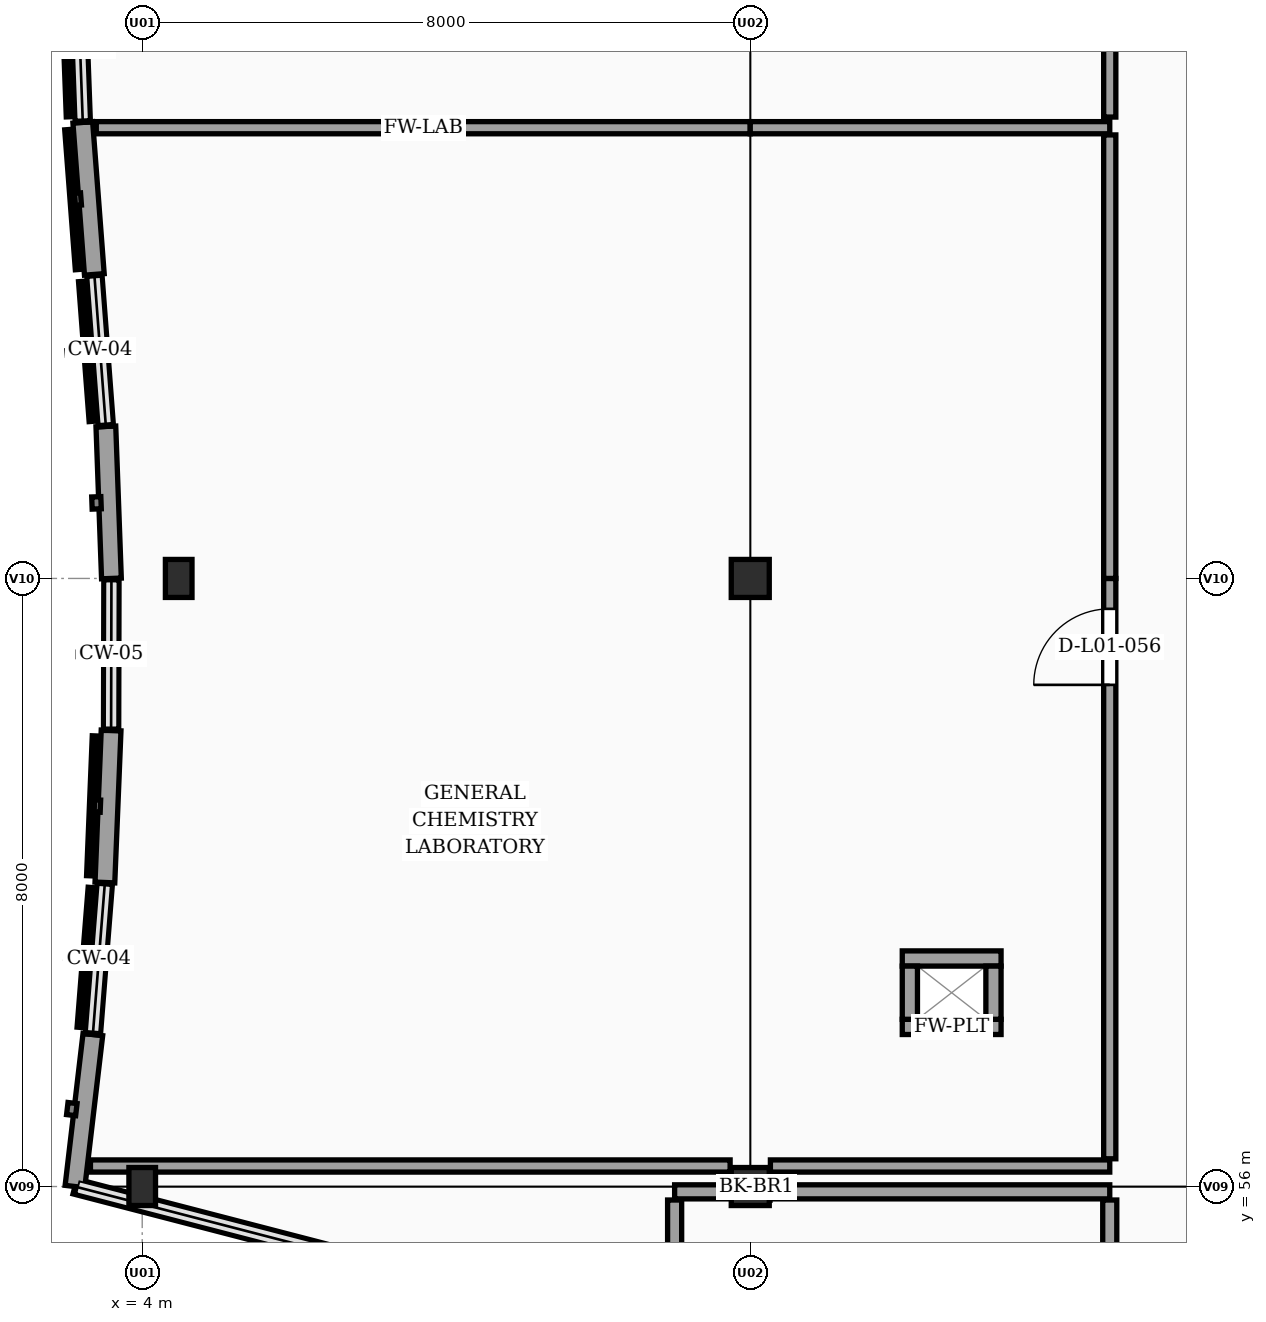
"""IFC4 building model, lengths in metres.
Left out: names, types, materials, properties, quantities, classifications, styles, units other than length and angle.
Written with IfcOpenShell. Run it as: python <this file> out.ifc"""

import sys

from ifc_helpers import new_model, si_unit, direction, frame, frame_2d, origin, origin_2d, place, context, subcontext, project, spatial, rectangle, extrude, element, fill, save


model = new_model("IFC4")
c1 = context("Model", 3, precision=1e-05, world=origin(), true_north=direction((0.0, 1.0)))
c2 = subcontext(c1, "Body", "Model", "MODEL_VIEW")
j1 = project(units=[si_unit("LENGTHUNIT", "METRE"), si_unit("PLANEANGLEUNIT", "RADIAN")], contexts=[c1])
p1 = place(None, origin())
s1 = spatial("IfcSite", under=j1, at=p1, CompositionType="ELEMENT")
p2 = place(p1, origin())
s2 = spatial("IfcBuilding", under=s1, at=p2, CompositionType="ELEMENT")
p3 = place(p2, frame((0.0, 0.0, 4.5)))
s3 = spatial("IfcBuildingStorey", under=s2, at=p3, CompositionType="ELEMENT", Elevation=4.5)
for number, where, z_axis, x_axis in (
    (1, (4.0, 56.0, 0.0), (0.0, 0.0, 1.0), (1.0, 0.0, 0.0)),
    (2, (4.48, 64.0, 0.0), (0.0, 0.0, 1.0), (1.0, 0.0, 0.0)),
):
    element("IfcColumn", number, at=place(p3, frame(where, z_axis=z_axis, x_axis=x_axis)), inside=s3, PredefinedType="PILASTER", context=c2, shape_type="SweptSolid", body=[
        extrude(rectangle(XDim=0.35, YDim=0.5, at=origin_2d()), origin(), (0.0, 0.0, 1.0), 3.9),
    ])
for number, where, z_axis, x_axis in (
    (3, (12.0, 56.0, 0.0), (0.0, 0.0, 1.0), (1.0, 0.0, 0.0)),
    (4, (12.0, 64.0, 0.0), (0.0, 0.0, 1.0), (1.0, 0.0, 0.0)),
):
    element("IfcColumn", number, at=place(p3, frame(where, z_axis=z_axis, x_axis=x_axis)), inside=s3, PredefinedType="COLUMN", context=c2, shape_type="SweptSolid", body=[
        extrude(rectangle(XDim=0.5, YDim=0.5, at=origin_2d()), origin(), (0.0, 0.0, 1.0), 3.9),
    ])
p4 = place(p3, frame((10.822, 54.0, 0.0), z_axis=(0.0, 0.0, 1.0), x_axis=(-0.967937555254, 0.251190941573, 0.0)))
e5 = element("IfcWall", 5, at=p4, inside=s3, PredefinedType="SOLIDWALL", context=c2, shape_type="SweptSolid", body=[
    extrude(rectangle(XDim=7.962, YDim=0.2, at=frame_2d((3.981, 0.0))), origin(), (0.0, 0.0, 1.0), 0.95),
])
p5 = place(p3, frame((3.115, 56.0, 0.0), z_axis=(0.0, 0.0, 1.0), x_axis=(0.116988959085, 0.99313321536, 0.0)))
e6 = element("IfcWall", 6, at=p5, inside=s3, PredefinedType="SOLIDWALL", context=c2, shape_type="SweptSolid", body=[
    extrude(rectangle(XDim=2.014, YDim=0.26, at=frame_2d((1.007, 0.0))), origin(), (0.0, 0.0, 1.0), 3.65),
])
p6 = place(p3, frame((3.351, 58.0, 0.0), z_axis=(0.0, 0.0, 1.0), x_axis=(0.078976178075, 0.996876503533, 0.0)))
e7 = element("IfcWall", 7, at=p6, inside=s3, PredefinedType="SOLIDWALL", context=c2, shape_type="SweptSolid", body=[
    extrude(rectangle(XDim=2.006, YDim=0.2, at=frame_2d((1.003, 0.0))), origin(), (0.0, 0.0, 1.0), 0.95),
])
p7 = place(p3, frame((3.509, 60.0, 0.0), z_axis=(0.0, 0.0, 1.0), x_axis=(0.040737639062, 0.99916987783, 0.0)))
e8 = element("IfcWall", 8, at=p7, inside=s3, PredefinedType="SOLIDWALL", context=c2, shape_type="SweptSolid", body=[
    extrude(rectangle(XDim=2.002, YDim=0.26, at=frame_2d((1.001, 0.0))), origin(), (0.0, 0.0, 1.0), 3.65),
])
p8 = place(p3, frame((3.591, 62.0, 0.0), z_axis=(0.0, 0.0, 1.0), x_axis=(0.002197260321, 0.999997586021, 0.0)))
e9 = element("IfcWall", 9, at=p8, inside=s3, PredefinedType="SOLIDWALL", context=c2, shape_type="SweptSolid", body=[
    extrude(rectangle(XDim=2.0, YDim=0.2, at=frame_2d((1.0, 0.0))), origin(), (0.0, 0.0, 1.0), 0.95),
])
p9 = place(p3, frame((3.595, 64.0, 0.0), z_axis=(0.0, 0.0, 1.0), x_axis=(-0.036596562065, 0.999330121454, 0.0)))
e10 = element("IfcWall", 10, at=p9, inside=s3, PredefinedType="SOLIDWALL", context=c2, shape_type="SweptSolid", body=[
    extrude(rectangle(XDim=2.001, YDim=0.26, at=frame_2d((1.0, 0.0))), origin(), (0.0, 0.0, 1.0), 3.65),
])
p10 = place(p3, frame((3.522, 66.0, 0.0), z_axis=(0.0, 0.0, 1.0), x_axis=(-0.075588789742, 0.997139074987, 0.0)))
e11 = element("IfcWall", 11, at=p10, inside=s3, PredefinedType="SOLIDWALL", context=c2, shape_type="SweptSolid", body=[
    extrude(rectangle(XDim=2.006, YDim=0.2, at=frame_2d((1.003, 0.0))), origin(), (0.0, 0.0, 1.0), 0.95),
])
p11 = place(p3, frame((3.37, 68.0, 0.0), z_axis=(0.0, 0.0, 1.0), x_axis=(-0.075709813676, 0.9971298933, 0.0)))
e12 = element("IfcWall", 12, at=p11, inside=s3, PredefinedType="SOLIDWALL", context=c2, shape_type="SweptSolid", body=[
    extrude(rectangle(XDim=2.006, YDim=0.26, at=frame_2d((1.003, 0.0))), origin(), (0.0, 0.0, 1.0), 3.65),
])
p12 = place(p3, frame((3.218, 70.0, 0.0), z_axis=(0.0, 0.0, 1.0), x_axis=(-0.036596562065, 0.999330121454, 0.0)))
e13 = element("IfcWall", 13, at=p12, inside=s3, PredefinedType="SOLIDWALL", context=c2, shape_type="SweptSolid", body=[
    extrude(rectangle(XDim=2.001, YDim=0.2, at=frame_2d((1.0, 0.0))), origin(), (0.0, 0.0, 1.0), 0.95),
])
for number, where, z_axis, x_axis in (
    (14, (15.3, 58.1, 0.0), (0.0, 0.0, 1.0), (-1.0, 0.0, 0.0)),
    (15, (14.0, 59.0, 0.0), (0.0, 0.0, 1.0), (1.0, 0.0, 0.0)),
):
    element("IfcWall", number, at=place(p3, frame(where, z_axis=z_axis, x_axis=x_axis)), inside=s3, PredefinedType="PARTITIONING", context=c2, shape_type="SweptSolid", body=[
        extrude(rectangle(XDim=1.3, YDim=0.2, at=frame_2d((0.65, 0.0))), origin(), (0.0, 0.0, 1.0), 3.65),
    ])
for number, where, z_axis, x_axis in (
    (16, (14.1, 58.2, 0.0), (0.0, 0.0, 1.0), (0.0, 1.0, 0.0)),
    (17, (15.2, 58.9, 0.0), (0.0, 0.0, 1.0), (0.0, -1.0, 0.0)),
):
    element("IfcWall", number, at=place(p3, frame(where, z_axis=z_axis, x_axis=x_axis)), inside=s3, PredefinedType="PARTITIONING", context=c2, shape_type="SweptSolid", body=[
        extrude(rectangle(XDim=0.7, YDim=0.2, at=frame_2d((0.35, 0.0))), origin(), (0.0, 0.0, 1.0), 3.65),
    ])
p13 = place(p3, frame((3.319, 56.27, 0.0), z_axis=(0.0, 0.0, 1.0), x_axis=(1.0, 0.0, 0.0)))
e18 = element("IfcWall", 18, at=p13, inside=s3, PredefinedType="PARTITIONING", context=c2, shape_type="SweptSolid", body=[
    extrude(rectangle(XDim=8.416, YDim=0.16, at=frame_2d((4.208, 0.0))), origin(), (0.0, 0.0, 1.0), 3.0),
])
p14 = place(p3, frame((12.265, 56.27, 0.0), z_axis=(0.0, 0.0, 1.0), x_axis=(1.0, 0.0, 0.0)))
e19 = element("IfcWall", 19, at=p14, inside=s3, PredefinedType="PARTITIONING", context=c2, shape_type="SweptSolid", body=[
    extrude(rectangle(XDim=4.465, YDim=0.16, at=frame_2d((2.232, 0.0))), origin(), (0.0, 0.0, 1.0), 3.0),
])
p15 = place(p3, frame((3.396, 69.93, 0.0), z_axis=(0.0, 0.0, 1.0), x_axis=(1.0, 0.0, 0.0)))
e20 = element("IfcWall", 20, at=p15, inside=s3, PredefinedType="PARTITIONING", context=c2, shape_type="SweptSolid", body=[
    extrude(rectangle(XDim=8.604, YDim=0.16, at=frame_2d((4.302, 0.0))), origin(), (0.0, 0.0, 1.0), 3.65),
])
p16 = place(p3, frame((12.0, 69.93, 0.0), z_axis=(0.0, 0.0, 1.0), x_axis=(1.0, 0.0, 0.0)))
e21 = element("IfcWall", 21, at=p16, inside=s3, PredefinedType="PARTITIONING", context=c2, shape_type="SweptSolid", body=[
    extrude(rectangle(XDim=4.73, YDim=0.16, at=frame_2d((2.365, 0.0))), origin(), (0.0, 0.0, 1.0), 3.65),
])
p17 = place(p3, frame((16.73, 56.365, 0.0), z_axis=(0.0, 0.0, 1.0), x_axis=(0.0, 1.0, 0.0)))
e22 = element("IfcWall", 22, at=p17, inside=s3, PredefinedType="PARTITIONING", context=c2, shape_type="SweptSolid", body=[
    extrude(rectangle(XDim=7.635, YDim=0.16, at=frame_2d((3.817, 0.0))), origin(), (0.0, 0.0, 1.0), 3.65),
])
p18 = place(p17, frame((6.235, 0.0, 0.0)))
e23 = element("IfcOpeningElement", 23, at=p18, cuts=e22, PredefinedType="OPENING", context=c2, shape_type="SweptSolid", body=[
    extrude(rectangle(XDim=1.0, YDim=2.15, at=frame_2d((0.5, 1.075))), frame((0.0, 0.09, 0.0), z_axis=(0.0, -1.0, 0.0), x_axis=(1.0, 0.0, 0.0)), (0.0, 0.0, 1.0), 0.18),
])
p19 = place(p3, frame((16.73, 64.0, 0.0), z_axis=(0.0, 0.0, 1.0), x_axis=(0.0, 1.0, 0.0)))
e24 = element("IfcWall", 24, at=p19, inside=s3, PredefinedType="PARTITIONING", context=c2, shape_type="SweptSolid", body=[
    extrude(rectangle(XDim=5.835, YDim=0.16, at=frame_2d((2.917, 0.0))), origin(), (0.0, 0.0, 1.0), 3.65),
])
p20 = place(p3, frame((16.73, 70.07, 0.0), z_axis=(0.0, 0.0, 1.0), x_axis=(0.0, 1.0, 0.0)))
e25 = element("IfcWall", 25, at=p20, inside=s3, PredefinedType="PARTITIONING", context=c2, shape_type="SweptSolid", body=[
    extrude(rectangle(XDim=1.93, YDim=0.16, at=frame_2d((0.965, 0.0))), origin(), (0.0, 0.0, 1.0), 3.65),
])
p21 = place(p3, frame((11.005, 55.93, 0.0), z_axis=(0.0, 0.0, 1.0), x_axis=(1.0, 0.0, 0.0)))
e26 = element("IfcWall", 26, at=p21, inside=s3, PredefinedType="PARTITIONING", context=c2, shape_type="SweptSolid", body=[
    extrude(rectangle(XDim=5.725, YDim=0.185, at=frame_2d((2.863, 0.0))), origin(), (0.0, 0.0, 1.0), 3.0),
])
p22 = place(p3, frame((11.005, 54.02, 0.0), z_axis=(0.0, 0.0, 1.0), x_axis=(0.0, 1.0, 0.0)))
e27 = element("IfcWall", 27, at=p22, inside=s3, PredefinedType="PARTITIONING", context=c2, shape_type="SweptSolid", body=[
    extrude(rectangle(XDim=1.802, YDim=0.185, at=frame_2d((0.901, 0.0))), origin(), (0.0, 0.0, 1.0), 3.65),
])
p23 = place(p3, frame((16.73, 50.0, 0.0), z_axis=(0.0, 0.0, 1.0), x_axis=(0.0, 1.0, 0.0)))
e28 = element("IfcWall", 28, at=p23, inside=s3, PredefinedType="PARTITIONING", context=c2, shape_type="SweptSolid", body=[
    extrude(rectangle(XDim=5.823, YDim=0.185, at=frame_2d((2.911, 0.0))), origin(), (0.0, 0.0, 1.0), 3.65),
])
p24 = place(p23, frame((2.54, 0.0, 0.0)))
e29 = element("IfcOpeningElement", 29, at=p24, cuts=e28, PredefinedType="OPENING", context=c2, shape_type="SweptSolid", body=[
    extrude(rectangle(XDim=0.92, YDim=2.2, at=frame_2d((0.46, 1.1))), frame((0.0, 0.103, 0.0), z_axis=(0.0, -1.0, 0.0), x_axis=(1.0, 0.0, 0.0)), (0.0, 0.0, 1.0), 0.205),
])
p25 = place(p18, origin())
e30 = element("IfcDoor", 30, at=p25, inside=s3, OperationType="SINGLE_SWING_LEFT", PredefinedType="DOOR", context=c2, shape_type="SweptSolid", body=[
    extrude(rectangle(XDim=1.0, YDim=2.15, at=frame_2d((0.5, 1.075))), frame((0.0, 0.025, 0.0), z_axis=(0.0, -1.0, 0.0), x_axis=(1.0, 0.0, 0.0)), (0.0, 0.0, 1.0), 0.05),
])
fill(e23, e30)
save(model, sys.argv[1])
